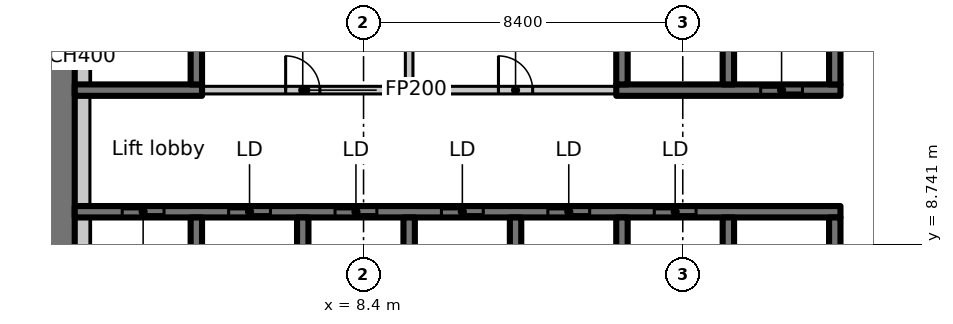
"""IFC4 building model, lengths in metres.
Left out: names, types, materials, properties, quantities, classifications, styles, units other than length and angle.
Written with IfcOpenShell. Run it as: python <this file> out.ifc"""

import sys

from ifc_helpers import new_model, si_unit, direction, frame, frame_2d, origin, place, context, subcontext, project, spatial, rectangle, extrude, element, fill, save


model = new_model("IFC4")
c1 = context("Model", 3, precision=1e-05, world=origin(), true_north=direction((0.0, 1.0)))
c2 = subcontext(c1, "Body", "Model", "MODEL_VIEW")
j1 = project(units=[si_unit("LENGTHUNIT", "METRE"), si_unit("PLANEANGLEUNIT", "RADIAN")], contexts=[c1])
p1 = place(None, origin())
s1 = spatial("IfcSite", under=j1, at=p1, CompositionType="ELEMENT")
p2 = place(p1, origin())
s2 = spatial("IfcBuilding", under=s1, at=p2, CompositionType="ELEMENT")
p3 = place(p2, frame((0.0, 0.0, 95.3)))
s3 = spatial("IfcBuildingStorey", under=s2, at=p3, CompositionType="ELEMENT", Elevation=95.3)
p4 = place(p3, frame((0.4, 7.136, 0.0), z_axis=(0.0, 0.0, 1.0), x_axis=(0.0, 1.0, 0.0)))
e1 = element("IfcWall", 1, at=p4, inside=s3, PredefinedType="SHEAR", context=c2, shape_type="SweptSolid", body=[
    extrude(rectangle(XDim=8.864, YDim=0.8, at=frame_2d((4.432, 0.0))), origin(), (0.0, 0.0, 1.0), 3.35),
])
p5 = place(p3, frame((0.8, 9.6, 0.0), z_axis=(0.0, 0.0, 1.0), x_axis=(1.0, 0.0, 0.0)))
e2 = element("IfcWall", 2, at=p5, inside=s3, PredefinedType="SHEAR", context=c2, shape_type="SweptSolid", body=[
    extrude(rectangle(XDim=20.15, YDim=0.3, at=frame_2d((10.075, 0.0))), origin(), (0.0, 0.0, 1.0), 3.35),
])
p6 = place(p5, frame((1.25, 0.0, 0.0)))
e3 = element("IfcOpeningElement", 3, at=p6, cuts=e2, PredefinedType="OPENING", context=c2, shape_type="SweptSolid", body=[
    extrude(rectangle(XDim=1.1, YDim=2.3, at=frame_2d((0.55, 1.15))), frame((0.0, 0.16, 0.0), z_axis=(0.0, -1.0, 0.0), x_axis=(1.0, 0.0, 0.0)), (0.0, 0.0, 1.0), 0.32),
])
p7 = place(p5, frame((4.05, 0.0, 0.0)))
e4 = element("IfcOpeningElement", 4, at=p7, cuts=e2, PredefinedType="OPENING", context=c2, shape_type="SweptSolid", body=[
    extrude(rectangle(XDim=1.1, YDim=2.3, at=frame_2d((0.55, 1.15))), frame((0.0, 0.16, 0.0), z_axis=(0.0, -1.0, 0.0), x_axis=(1.0, 0.0, 0.0)), (0.0, 0.0, 1.0), 0.32),
])
p8 = place(p5, frame((6.85, 0.0, 0.0)))
e5 = element("IfcOpeningElement", 5, at=p8, cuts=e2, PredefinedType="OPENING", context=c2, shape_type="SweptSolid", body=[
    extrude(rectangle(XDim=1.1, YDim=2.3, at=frame_2d((0.55, 1.15))), frame((0.0, 0.16, 0.0), z_axis=(0.0, -1.0, 0.0), x_axis=(1.0, 0.0, 0.0)), (0.0, 0.0, 1.0), 0.32),
])
p9 = place(p5, frame((9.65, 0.0, 0.0)))
e6 = element("IfcOpeningElement", 6, at=p9, cuts=e2, PredefinedType="OPENING", context=c2, shape_type="SweptSolid", body=[
    extrude(rectangle(XDim=1.1, YDim=2.3, at=frame_2d((0.55, 1.15))), frame((0.0, 0.16, 0.0), z_axis=(0.0, -1.0, 0.0), x_axis=(1.0, 0.0, 0.0)), (0.0, 0.0, 1.0), 0.32),
])
p10 = place(p5, frame((12.45, 0.0, 0.0)))
e7 = element("IfcOpeningElement", 7, at=p10, cuts=e2, PredefinedType="OPENING", context=c2, shape_type="SweptSolid", body=[
    extrude(rectangle(XDim=1.1, YDim=2.3, at=frame_2d((0.55, 1.15))), frame((0.0, 0.16, 0.0), z_axis=(0.0, -1.0, 0.0), x_axis=(1.0, 0.0, 0.0)), (0.0, 0.0, 1.0), 0.32),
])
p11 = place(p5, frame((15.25, 0.0, 0.0)))
e8 = element("IfcOpeningElement", 8, at=p11, cuts=e2, PredefinedType="OPENING", context=c2, shape_type="SweptSolid", body=[
    extrude(rectangle(XDim=1.1, YDim=2.3, at=frame_2d((0.55, 1.15))), frame((0.0, 0.16, 0.0), z_axis=(0.0, -1.0, 0.0), x_axis=(1.0, 0.0, 0.0)), (0.0, 0.0, 1.0), 0.32),
])
for number, where, z_axis, x_axis in (
    (9, (4.0, 7.15, 0.0), (0.0, 0.0, 1.0), (0.0, 1.0, 0.0)),
    (10, (6.8, 7.15, 0.0), (0.0, 0.0, 1.0), (0.0, 1.0, 0.0)),
    (11, (9.6, 7.15, 0.0), (0.0, 0.0, 1.0), (0.0, 1.0, 0.0)),
    (12, (12.4, 7.15, 0.0), (0.0, 0.0, 1.0), (0.0, 1.0, 0.0)),
    (13, (15.2, 7.15, 0.0), (0.0, 0.0, 1.0), (0.0, 1.0, 0.0)),
    (14, (18.0, 7.15, 0.0), (0.0, 0.0, 1.0), (0.0, 1.0, 0.0)),
    (15, (20.8, 7.15, 0.0), (0.0, 0.0, 1.0), (0.0, 1.0, 0.0)),
):
    element("IfcWall", number, at=place(p3, frame(where, z_axis=z_axis, x_axis=x_axis)), inside=s3, PredefinedType="SHEAR", context=c2, shape_type="SweptSolid", body=[
        extrude(rectangle(XDim=2.3, YDim=0.3, at=frame_2d((1.15, 0.0))), origin(), (0.0, 0.0, 1.0), 3.35),
    ])
p12 = place(p3, frame((0.8, 12.8, 0.0), z_axis=(0.0, 0.0, 1.0), x_axis=(1.0, 0.0, 0.0)))
e16 = element("IfcWall", 16, at=p12, inside=s3, PredefinedType="SHEAR", context=c2, shape_type="SweptSolid", body=[
    extrude(rectangle(XDim=3.35, YDim=0.3, at=frame_2d((1.675, 0.0))), origin(), (0.0, 0.0, 1.0), 3.35),
])
p13 = place(p3, frame((4.0, 12.95, 0.0), z_axis=(0.0, 0.0, 1.0), x_axis=(0.0, 1.0, 0.0)))
e17 = element("IfcWall", 17, at=p13, inside=s3, PredefinedType="SHEAR", context=c2, shape_type="SweptSolid", body=[
    extrude(rectangle(XDim=3.05, YDim=0.3, at=frame_2d((1.525, 0.0))), origin(), (0.0, 0.0, 1.0), 3.35),
])
p14 = place(p3, frame((15.05, 12.8, 0.0), z_axis=(0.0, 0.0, 1.0), x_axis=(1.0, 0.0, 0.0)))
e18 = element("IfcWall", 18, at=p14, inside=s3, PredefinedType="SHEAR", context=c2, shape_type="SweptSolid", body=[
    extrude(rectangle(XDim=5.9, YDim=0.3, at=frame_2d((2.95, 0.0))), origin(), (0.0, 0.0, 1.0), 3.35),
])
p15 = place(p14, frame((3.8, 0.0, 0.0)))
e19 = element("IfcOpeningElement", 19, at=p15, cuts=e18, PredefinedType="OPENING", context=c2, shape_type="SweptSolid", body=[
    extrude(rectangle(XDim=1.1, YDim=2.3, at=frame_2d((0.55, 1.15))), frame((0.0, 0.16, 0.0), z_axis=(0.0, -1.0, 0.0), x_axis=(1.0, 0.0, 0.0)), (0.0, 0.0, 1.0), 0.32),
])
for number, where, z_axis, x_axis in (
    (20, (15.2, 12.95, 0.0), (0.0, 0.0, 1.0), (0.0, 1.0, 0.0)),
    (21, (18.0, 12.95, 0.0), (0.0, 0.0, 1.0), (0.0, 1.0, 0.0)),
    (22, (20.8, 12.95, 0.0), (0.0, 0.0, 1.0), (0.0, 1.0, 0.0)),
):
    element("IfcWall", number, at=place(p3, frame(where, z_axis=z_axis, x_axis=x_axis)), inside=s3, PredefinedType="SHEAR", context=c2, shape_type="SweptSolid", body=[
        extrude(rectangle(XDim=3.05, YDim=0.3, at=frame_2d((1.525, 0.0))), origin(), (0.0, 0.0, 1.0), 3.35),
    ])
p16 = place(p3, frame((4.162, 12.8, 0.0), z_axis=(0.0, 0.0, 1.0), x_axis=(1.0, 0.0, 0.0)))
e23 = element("IfcWall", 23, at=p16, inside=s3, PredefinedType="PARTITIONING", context=c2, shape_type="SweptSolid", body=[
    extrude(rectangle(XDim=5.438, YDim=0.2, at=frame_2d((2.719, 0.0))), origin(), (0.0, 0.0, 1.0), 3.35),
])
p17 = place(p16, frame((2.188, 0.0, 0.0)))
e24 = element("IfcOpeningElement", 24, at=p17, cuts=e23, PredefinedType="OPENING", context=c2, shape_type="SweptSolid", body=[
    extrude(rectangle(XDim=0.9, YDim=2.1, at=frame_2d((0.45, 1.05))), frame((0.0, 0.11, 0.0), z_axis=(0.0, -1.0, 0.0), x_axis=(1.0, 0.0, 0.0)), (0.0, 0.0, 1.0), 0.22),
])
p18 = place(p3, frame((9.6, 12.8, 0.0), z_axis=(0.0, 0.0, 1.0), x_axis=(1.0, 0.0, 0.0)))
e25 = element("IfcWall", 25, at=p18, inside=s3, PredefinedType="PARTITIONING", context=c2, shape_type="SweptSolid", body=[
    extrude(rectangle(XDim=5.438, YDim=0.2, at=frame_2d((2.719, 0.0))), origin(), (0.0, 0.0, 1.0), 3.35),
])
p19 = place(p18, frame((2.35, 0.0, 0.0)))
e26 = element("IfcOpeningElement", 26, at=p19, cuts=e25, PredefinedType="OPENING", context=c2, shape_type="SweptSolid", body=[
    extrude(rectangle(XDim=0.9, YDim=2.1, at=frame_2d((0.45, 1.05))), frame((0.0, 0.11, 0.0), z_axis=(0.0, -1.0, 0.0), x_axis=(1.0, 0.0, 0.0)), (0.0, 0.0, 1.0), 0.22),
])
p20 = place(p3, frame((9.6, 15.588, 0.0), z_axis=(0.0, 0.0, 1.0), x_axis=(0.0, -1.0, 0.0)))
e27 = element("IfcWall", 27, at=p20, inside=s3, PredefinedType="PARTITIONING", context=c2, shape_type="SweptSolid", body=[
    extrude(rectangle(XDim=2.688, YDim=0.2, at=frame_2d((1.344, 0.0))), origin(), (0.0, 0.0, 1.0), 3.35),
])
p21 = place(p3, frame((1.0, 7.15, 0.0), z_axis=(0.0, 0.0, 1.0), x_axis=(0.0, 1.0, 0.0)))
e28 = element("IfcWall", 28, at=p21, inside=s3, PredefinedType="PARTITIONING", context=c2, shape_type="SweptSolid", body=[
    extrude(rectangle(XDim=2.3, YDim=0.4, at=frame_2d((1.15, 0.0))), origin(), (0.0, 0.0, 1.0), 3.35),
])
p22 = place(p3, frame((1.0, 9.75, 0.0), z_axis=(0.0, 0.0, 1.0), x_axis=(0.0, 1.0, 0.0)))
e29 = element("IfcWall", 29, at=p22, inside=s3, PredefinedType="PARTITIONING", context=c2, shape_type="SweptSolid", body=[
    extrude(rectangle(XDim=2.9, YDim=0.4, at=frame_2d((1.45, 0.0))), origin(), (0.0, 0.0, 1.0), 3.35),
])
p23 = place(p3, frame((1.0, 12.95, 0.0), z_axis=(0.0, 0.0, 1.0), x_axis=(0.0, 1.0, 0.0)))
e30 = element("IfcWall", 30, at=p23, inside=s3, PredefinedType="PARTITIONING", context=c2, shape_type="SweptSolid", body=[
    extrude(rectangle(XDim=2.65, YDim=0.4, at=frame_2d((1.325, 0.0))), origin(), (0.0, 0.0, 1.0), 3.35),
])
p24 = place(p6, origin())
e31 = element("IfcDoor", 31, at=p24, inside=s3, OperationType="SLIDING_TO_LEFT", PredefinedType="DOOR", context=c2, shape_type="SweptSolid", body=[
    extrude(rectangle(XDim=1.1, YDim=2.3, at=frame_2d((0.55, 1.15))), frame((0.0, 0.025, 0.0), z_axis=(0.0, -1.0, 0.0), x_axis=(1.0, 0.0, 0.0)), (0.0, 0.0, 1.0), 0.05),
])
fill(e3, e31)
p25 = place(p7, origin())
e32 = element("IfcDoor", 32, at=p25, inside=s3, OperationType="SLIDING_TO_LEFT", PredefinedType="DOOR", context=c2, shape_type="SweptSolid", body=[
    extrude(rectangle(XDim=1.1, YDim=2.3, at=frame_2d((0.55, 1.15))), frame((0.0, 0.025, 0.0), z_axis=(0.0, -1.0, 0.0), x_axis=(1.0, 0.0, 0.0)), (0.0, 0.0, 1.0), 0.05),
])
fill(e4, e32)
p26 = place(p8, origin())
e33 = element("IfcDoor", 33, at=p26, inside=s3, OperationType="SLIDING_TO_LEFT", PredefinedType="DOOR", context=c2, shape_type="SweptSolid", body=[
    extrude(rectangle(XDim=1.1, YDim=2.3, at=frame_2d((0.55, 1.15))), frame((0.0, 0.025, 0.0), z_axis=(0.0, -1.0, 0.0), x_axis=(1.0, 0.0, 0.0)), (0.0, 0.0, 1.0), 0.05),
])
fill(e5, e33)
p27 = place(p9, origin())
e34 = element("IfcDoor", 34, at=p27, inside=s3, OperationType="SLIDING_TO_LEFT", PredefinedType="DOOR", context=c2, shape_type="SweptSolid", body=[
    extrude(rectangle(XDim=1.1, YDim=2.3, at=frame_2d((0.55, 1.15))), frame((0.0, 0.025, 0.0), z_axis=(0.0, -1.0, 0.0), x_axis=(1.0, 0.0, 0.0)), (0.0, 0.0, 1.0), 0.05),
])
fill(e6, e34)
p28 = place(p10, origin())
e35 = element("IfcDoor", 35, at=p28, inside=s3, OperationType="SLIDING_TO_LEFT", PredefinedType="DOOR", context=c2, shape_type="SweptSolid", body=[
    extrude(rectangle(XDim=1.1, YDim=2.3, at=frame_2d((0.55, 1.15))), frame((0.0, 0.025, 0.0), z_axis=(0.0, -1.0, 0.0), x_axis=(1.0, 0.0, 0.0)), (0.0, 0.0, 1.0), 0.05),
])
fill(e7, e35)
p29 = place(p11, origin())
e36 = element("IfcDoor", 36, at=p29, inside=s3, OperationType="SLIDING_TO_LEFT", PredefinedType="DOOR", context=c2, shape_type="SweptSolid", body=[
    extrude(rectangle(XDim=1.1, YDim=2.3, at=frame_2d((0.55, 1.15))), frame((0.0, 0.025, 0.0), z_axis=(0.0, -1.0, 0.0), x_axis=(1.0, 0.0, 0.0)), (0.0, 0.0, 1.0), 0.05),
])
fill(e8, e36)
p30 = place(p15, origin())
e37 = element("IfcDoor", 37, at=p30, inside=s3, OperationType="SLIDING_TO_LEFT", PredefinedType="DOOR", context=c2, shape_type="SweptSolid", body=[
    extrude(rectangle(XDim=1.1, YDim=2.3, at=frame_2d((0.55, 1.15))), frame((0.0, 0.025, 0.0), z_axis=(0.0, -1.0, 0.0), x_axis=(1.0, 0.0, 0.0)), (0.0, 0.0, 1.0), 0.05),
])
fill(e19, e37)
p31 = place(p17, origin())
e38 = element("IfcDoor", 38, at=p31, inside=s3, OperationType="SINGLE_SWING_RIGHT", PredefinedType="DOOR", context=c2, shape_type="SweptSolid", body=[
    extrude(rectangle(XDim=0.9, YDim=2.1, at=frame_2d((0.45, 1.05))), frame((0.0, 0.025, 0.0), z_axis=(0.0, -1.0, 0.0), x_axis=(1.0, 0.0, 0.0)), (0.0, 0.0, 1.0), 0.05),
])
fill(e24, e38)
p32 = place(p19, origin())
e39 = element("IfcDoor", 39, at=p32, inside=s3, OperationType="SINGLE_SWING_LEFT", PredefinedType="DOOR", context=c2, shape_type="SweptSolid", body=[
    extrude(rectangle(XDim=0.9, YDim=2.1, at=frame_2d((0.45, 1.05))), frame((0.0, 0.025, 0.0), z_axis=(0.0, -1.0, 0.0), x_axis=(1.0, 0.0, 0.0)), (0.0, 0.0, 1.0), 0.05),
])
fill(e26, e39)
save(model, sys.argv[1])
